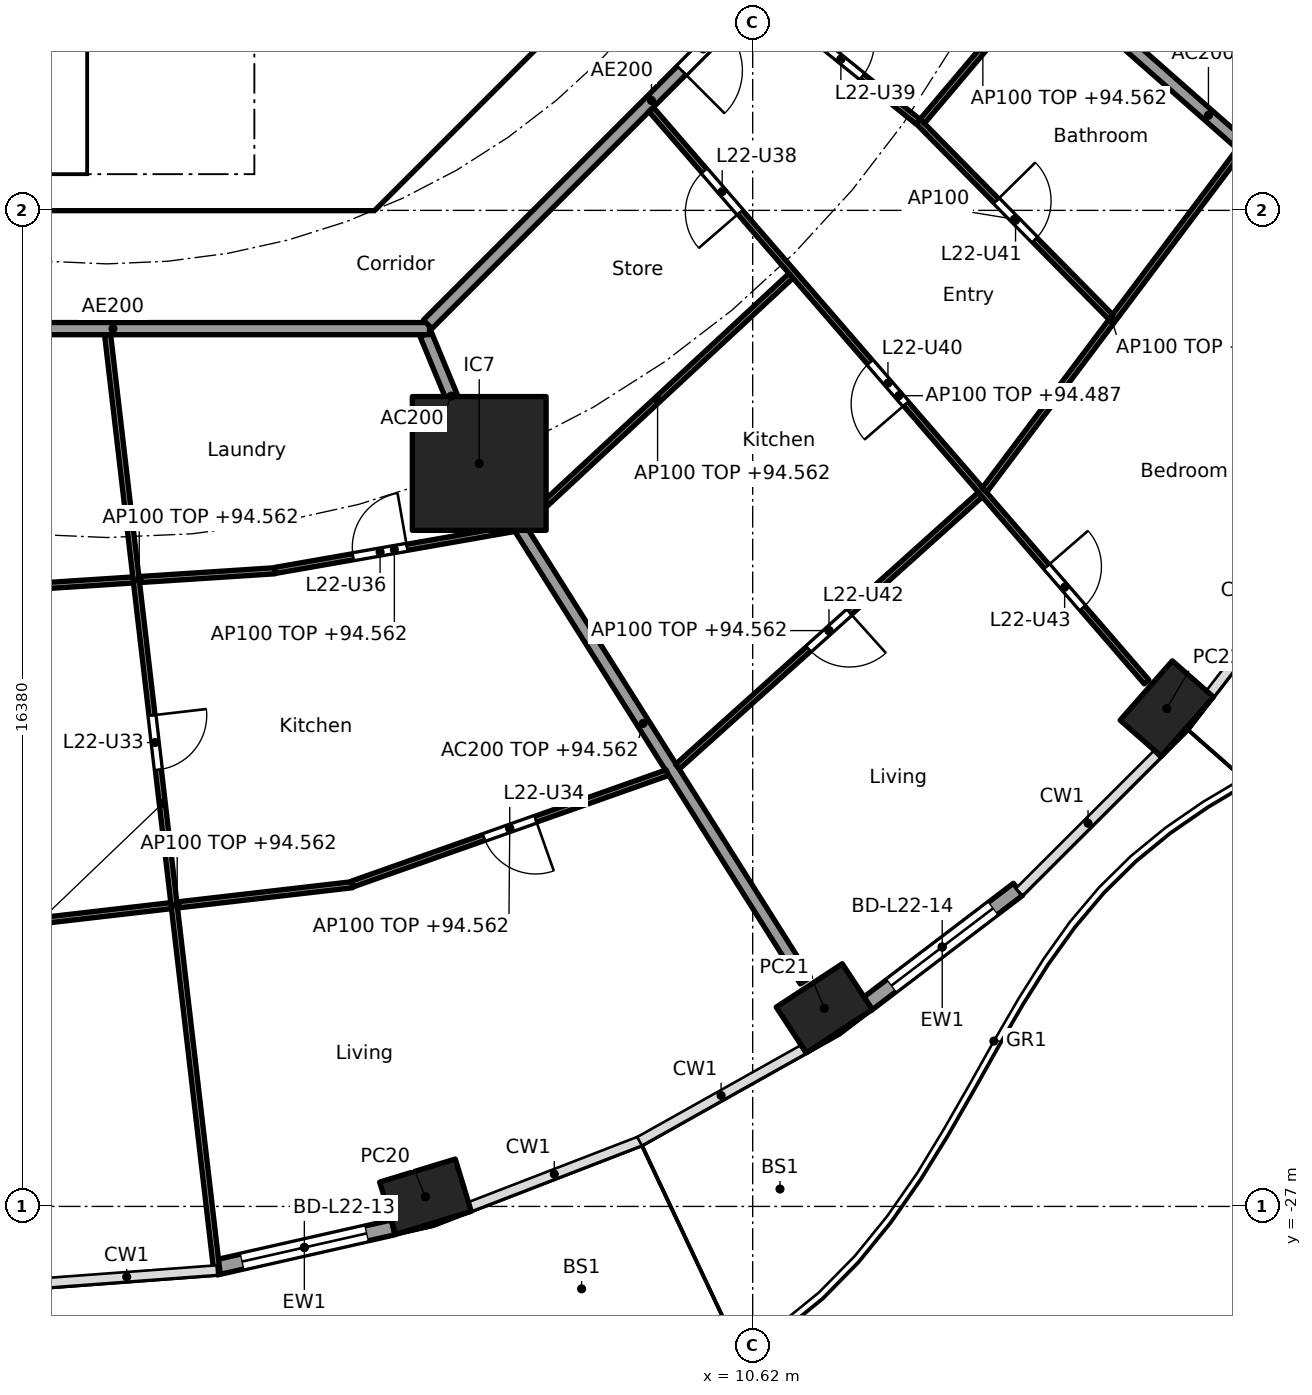
"""IFC4 building model, lengths in metres.
Left out: names, types, materials, properties, quantities, classifications, styles, units other than length and angle.
Written with IfcOpenShell. Run it as: python <this file> out.ifc"""

import sys

from ifc_helpers import new_model, si_unit, direction, frame, frame_2d, origin, origin_2d, place, context, subcontext, project, spatial, polyline, rectangle, hollow_rectangle, outline, extrude, element, fill, save


model = new_model("IFC4")
c1 = context("Model", 3, precision=1e-05, world=origin(), true_north=direction((0.0, 1.0)))
c2 = subcontext(c1, "Body", "Model", "MODEL_VIEW")
j1 = project(units=[si_unit("LENGTHUNIT", "METRE"), si_unit("PLANEANGLEUNIT", "RADIAN")], contexts=[c1])
p1 = place(None, origin())
s1 = spatial("IfcSite", under=j1, at=p1, CompositionType="ELEMENT")
p2 = place(p1, origin())
s2 = spatial("IfcBuilding", under=s1, at=p2, CompositionType="ELEMENT")
p3 = place(p2, frame((0.0, 0.0, 91.8)))
s3 = spatial("IfcBuildingStorey", under=s2, at=p3, CompositionType="ELEMENT", Elevation=91.8)
for number, where, z_axis, x_axis in (
    (1, (5.239, -26.841, 0.0), (0.0, 0.0, 1.0), (0.957, 0.292, 0.0)),
    (2, (11.798, -23.742, 0.0), (0.0, 0.0, 1.0), (0.836, 0.549, 0.0)),
    (3, (17.43, -18.813, 0.0), (0.0, 0.0, 1.0), (0.66, 0.751, 0.0)),
):
    element("IfcColumn", number, at=place(p3, frame(where, z_axis=z_axis, x_axis=x_axis)), inside=s3, PredefinedType="COLUMN", context=c2, shape_type="SweptSolid", body=[
        extrude(hollow_rectangle(XDim=1.3, YDim=0.9, WallThickness=0.045, at=origin_2d()), origin(), (0.0, 0.0, 1.0), 3.7),
    ])
p4 = place(p3, frame((6.123, -14.782, 0.0), z_axis=(0.0, 0.0, 1.0), x_axis=(1.0, 0.0, 0.0)))
e4 = element("IfcColumn", 4, at=p4, inside=s3, PredefinedType="COLUMN", context=c2, shape_type="SweptSolid", body=[
    extrude(rectangle(XDim=2.2, YDim=2.2, at=origin_2d()), origin(), (0.0, 0.0, 1.0), 3.7),
])
p5 = place(p3, frame((4.707, -27.345, 0.0), z_axis=(0.0, 0.0, 1.0), x_axis=(-0.975317607872, -0.220806620767, 0.0)))
e5 = element("IfcWall", 5, at=p5, inside=s3, PredefinedType="SOLIDWALL", context=c2, shape_type="SweptSolid", body=[
    extrude(rectangle(XDim=2.993, YDim=0.25, at=frame_2d((1.497, 0.0))), origin(), (0.0, 0.0, 1.0), 3.44),
])
p6 = place(p5, frame((0.447, 0.0, 0.0)))
e6 = element("IfcOpeningElement", 6, at=p6, cuts=e5, PredefinedType="OPENING", context=c2, shape_type="SweptSolid", body=[
    extrude(rectangle(XDim=2.1, YDim=2.4, at=frame_2d((1.05, 1.2))), frame((0.0, 0.135, 0.0), z_axis=(0.0, -1.0, 0.0), x_axis=(1.0, 0.0, 0.0)), (0.0, 0.0, 1.0), 0.27),
])
p7 = place(p3, frame((14.984, -21.785, 0.0), z_axis=(0.0, 0.0, 1.0), x_axis=(-0.796037575978, -0.605247203736, 0.0)))
e7 = element("IfcWall", 7, at=p7, inside=s3, PredefinedType="SOLIDWALL", context=c2, shape_type="SweptSolid", body=[
    extrude(rectangle(XDim=3.134, YDim=0.25, at=frame_2d((1.567, 0.0))), origin(), (0.0, 0.0, 1.0), 3.44),
])
p8 = place(p7, frame((0.517, 0.0, 0.0)))
e8 = element("IfcOpeningElement", 8, at=p8, cuts=e7, PredefinedType="OPENING", context=c2, shape_type="SweptSolid", body=[
    extrude(rectangle(XDim=2.1, YDim=2.4, at=frame_2d((1.05, 1.2))), frame((0.0, 0.135, 0.0), z_axis=(0.0, -1.0, 0.0), x_axis=(1.0, 0.0, 0.0)), (0.0, 0.0, 1.0), 0.27),
])
p9 = place(p3, frame((4.613, -9.988, 0.0), z_axis=(0.0, 0.0, 1.0), x_axis=(0.707106781187, 0.707106781187, 0.0)))
e9 = element("IfcWall", 9, at=p9, inside=s3, PredefinedType="SHEAR", context=c2, shape_type="SweptSolid", body=[
    extrude(rectangle(XDim=7.602, YDim=0.6, at=frame_2d((3.801, 0.0))), origin(), (0.0, 0.0, 1.0), 3.44),
])
p10 = place(p9, frame((3.201, 0.0, 0.0)))
e10 = element("IfcOpeningElement", 10, at=p10, cuts=e9, PredefinedType="OPENING", context=c2, shape_type="SweptSolid", body=[
    extrude(rectangle(XDim=1.2, YDim=2.1, at=frame_2d((0.6, 1.05))), frame((0.0, 0.31, 0.0), z_axis=(0.0, -1.0, 0.0), x_axis=(1.0, 0.0, 0.0)), (0.0, 0.0, 1.0), 0.62),
])
p11 = place(p3, frame((4.0, -10.025, 0.0), z_axis=(0.0, 0.0, 1.0), x_axis=(0.0, 1.0, 0.0)))
e11 = element("IfcWall", 11, at=p11, inside=s3, PredefinedType="SOLIDWALL", context=c2, shape_type="SweptSolid", body=[
    extrude(rectangle(XDim=3.0, YDim=0.2, at=frame_2d((1.5, 0.0))), origin(), (0.0, 0.0, 1.0), 3.44),
])
p12 = place(p11, frame((0.975, 0.0, 0.0)))
e12 = element("IfcOpeningElement", 12, at=p12, cuts=e11, PredefinedType="OPENING", context=c2, shape_type="SweptSolid", body=[
    extrude(rectangle(XDim=1.1, YDim=2.1, at=frame_2d((0.55, 1.05))), frame((0.0, 0.11, 0.0), z_axis=(0.0, -1.0, 0.0), x_axis=(1.0, 0.0, 0.0)), (0.0, 0.0, 1.0), 0.22),
])
p13 = place(p3, origin())
e13 = element("IfcWall", 13, at=p13, inside=s3, PredefinedType="SHEAR", context=c2, shape_type="SweptSolid", body=[
    extrude(outline(polyline([(-4.152, -10.025), (4.152, -10.025), (4.401, -9.776), (4.825, -10.2), (4.401, -10.625), (-4.401, -10.625), (-4.825, -10.2), (-4.401, -9.776), (-4.152, -10.025)])), origin(), (0.0, 0.0, 1.0), 3.44),
])
p14 = place(p3, frame((5.243, -12.657, 0.0), z_axis=(0.0, 0.0, 1.0), x_axis=(0.382747093259, -0.923853160736, 0.0)))
e14 = element("IfcWall", 14, at=p14, inside=s3, PredefinedType="PARTITIONING", context=c2, shape_type="SweptSolid", body=[
    extrude(rectangle(XDim=2.2, YDim=0.2, at=frame_2d((1.1, 0.0))), origin(), (0.0, 0.0, 1.0), 3.44),
])
p15 = place(p3, frame((6.15, -14.824, 0.0), z_axis=(0.0, 0.0, 1.0), x_axis=(0.533492589682, -0.845804739142, 0.0)))
e15 = element("IfcWall", 15, at=p15, inside=s3, PredefinedType="PARTITIONING", context=c2, shape_type="SweptSolid", body=[
    extrude(rectangle(XDim=10.006, YDim=0.2, at=frame_2d((5.003, 0.0))), origin(), (0.0, 0.0, 1.0), 2.762),
])
p16 = place(p3, frame((14.82, -6.156, 0.0), z_axis=(0.0, 0.0, 1.0), x_axis=(0.750582231659, -0.660777052808, 0.0)))
e16 = element("IfcWall", 16, at=p16, inside=s3, PredefinedType="PARTITIONING", context=c2, shape_type="SweptSolid", body=[
    extrude(rectangle(XDim=8.781, YDim=0.2, at=frame_2d((4.391, 0.0))), origin(), (0.0, 0.0, 1.0), 2.762),
])
p17 = place(p3, frame((-5.104, -12.565, 0.0), z_axis=(0.0, 0.0, 1.0), x_axis=(1.0, 0.0, 0.0)))
e17 = element("IfcWall", 17, at=p17, inside=s3, PredefinedType="PARTITIONING", context=c2, shape_type="SweptSolid", body=[
    extrude(rectangle(XDim=10.409, YDim=0.2, at=frame_2d((5.205, 0.0))), origin(), (0.0, 0.0, 1.0), 3.44),
])
p18 = place(p3, frame((5.275, -12.494, 0.0), z_axis=(0.0, 0.0, 1.0), x_axis=(0.707106781187, 0.707106781187, 0.0)))
e18 = element("IfcWall", 18, at=p18, inside=s3, PredefinedType="PARTITIONING", context=c2, shape_type="SweptSolid", body=[
    extrude(rectangle(XDim=10.409, YDim=0.2, at=frame_2d((5.205, 0.0))), origin(), (0.0, 0.0, 1.0), 3.44),
])
p19 = place(p18, frame((5.906, 0.0, 0.0)))
e19 = element("IfcOpeningElement", 19, at=p19, cuts=e18, PredefinedType="OPENING", context=c2, shape_type="SweptSolid", body=[
    extrude(rectangle(XDim=1.0, YDim=2.1, at=frame_2d((0.5, 1.05))), frame((0.0, 0.11, 0.0), z_axis=(0.0, -1.0, 0.0), x_axis=(1.0, 0.0, 0.0)), (0.0, 0.0, 1.0), 0.22),
])
p20 = place(p3, frame((-1.703, -16.836, 0.0), z_axis=(0.0, 0.0, 1.0), x_axis=(0.997899919101, 0.064774620473, 0.0)))
e20 = element("IfcWall", 20, at=p20, inside=s3, PredefinedType="PARTITIONING", context=c2, shape_type="SweptSolid", body=[
    extrude(rectangle(XDim=4.478, YDim=0.1, at=frame_2d((2.239, 0.0))), origin(), (0.0, 0.0, 1.0), 2.762),
])
p21 = place(p3, frame((-1.726, -22.375, 0.0), z_axis=(0.0, 0.0, 1.0), x_axis=(0.993392336919, 0.114767874207, 0.0)))
e21 = element("IfcWall", 21, at=p21, inside=s3, PredefinedType="PARTITIONING", context=c2, shape_type="SweptSolid", body=[
    extrude(rectangle(XDim=5.801, YDim=0.1, at=frame_2d((2.9, 0.0))), origin(), (0.0, 0.0, 1.0), 2.762),
])
p22 = place(p3, frame((0.011, -12.664, 0.0), z_axis=(0.0, 0.0, 1.0), x_axis=(0.115841404661, -0.993267722704, 0.0)))
e22 = element("IfcWall", 22, at=p22, inside=s3, PredefinedType="PARTITIONING", context=c2, shape_type="SweptSolid", body=[
    extrude(rectangle(XDim=15.528, YDim=0.1, at=frame_2d((7.764, 0.0))), origin(), (0.0, 0.0, 1.0), 2.687),
])
p23 = place(p22, frame((6.303, 0.0, 0.0)))
e23 = element("IfcOpeningElement", 23, at=p23, cuts=e22, PredefinedType="OPENING", context=c2, shape_type="SweptSolid", body=[
    extrude(rectangle(XDim=0.9, YDim=2.1, at=frame_2d((0.45, 1.05))), frame((0.0, 0.06, 0.0), z_axis=(0.0, -1.0, 0.0), x_axis=(1.0, 0.0, 0.0)), (0.0, 0.0, 1.0), 0.12),
])
p24 = place(p3, frame((2.765, -16.541, 0.0), z_axis=(0.0, 0.0, 1.0), x_axis=(0.984998714702, 0.172561676036, 0.0)))
e24 = element("IfcWall", 24, at=p24, inside=s3, PredefinedType="PARTITIONING", context=c2, shape_type="SweptSolid", body=[
    extrude(rectangle(XDim=3.984, YDim=0.1, at=frame_2d((1.992, 0.0))), origin(), (0.0, 0.0, 1.0), 2.762),
])
p25 = place(p24, frame((1.304, 0.0, 0.0)))
e25 = element("IfcOpeningElement", 25, at=p25, cuts=e24, PredefinedType="OPENING", context=c2, shape_type="SweptSolid", body=[
    extrude(rectangle(XDim=0.9, YDim=2.1, at=frame_2d((0.45, 1.05))), frame((0.0, 0.06, 0.0), z_axis=(0.0, -1.0, 0.0), x_axis=(1.0, 0.0, 0.0)), (0.0, 0.0, 1.0), 0.12),
])
p26 = place(p3, frame((4.034, -21.698, 0.0), z_axis=(0.0, 0.0, 1.0), x_axis=(0.942861482644, 0.33318497047, 0.0)))
e26 = element("IfcWall", 26, at=p26, inside=s3, PredefinedType="PARTITIONING", context=c2, shape_type="SweptSolid", body=[
    extrude(rectangle(XDim=5.495, YDim=0.1, at=frame_2d((2.748, 0.0))), origin(), (0.0, 0.0, 1.0), 2.762),
])
p27 = place(p26, frame((2.297, 0.0, 0.0)))
e27 = element("IfcOpeningElement", 27, at=p27, cuts=e26, PredefinedType="OPENING", context=c2, shape_type="SweptSolid", body=[
    extrude(rectangle(XDim=0.9, YDim=2.1, at=frame_2d((0.45, 1.05))), frame((0.0, 0.06, 0.0), z_axis=(0.0, -1.0, 0.0), x_axis=(1.0, 0.0, 0.0)), (0.0, 0.0, 1.0), 0.12),
])
p28 = place(p3, frame((6.861, -15.768, 0.0), z_axis=(0.0, 0.0, 1.0), x_axis=(0.733011256509, 0.680216508056, 0.0)))
e28 = element("IfcWall", 28, at=p28, inside=s3, PredefinedType="PARTITIONING", context=c2, shape_type="SweptSolid", body=[
    extrude(rectangle(XDim=5.989, YDim=0.1, at=frame_2d((2.994, 0.0))), origin(), (0.0, 0.0, 1.0), 2.762),
])
p29 = place(p3, frame((9.384, -19.768, 0.0), z_axis=(0.0, 0.0, 1.0), x_axis=(0.74387407395, 0.668319805262, 0.0)))
e29 = element("IfcWall", 29, at=p29, inside=s3, PredefinedType="PARTITIONING", context=c2, shape_type="SweptSolid", body=[
    extrude(rectangle(XDim=6.695, YDim=0.1, at=frame_2d((3.348, 0.0))), origin(), (0.0, 0.0, 1.0), 2.762),
])
p30 = place(p29, frame((2.898, 0.0, 0.0)))
e30 = element("IfcOpeningElement", 30, at=p30, cuts=e29, PredefinedType="OPENING", context=c2, shape_type="SweptSolid", body=[
    extrude(rectangle(XDim=0.9, YDim=2.1, at=frame_2d((0.45, 1.05))), frame((0.0, 0.06, 0.0), z_axis=(0.0, -1.0, 0.0), x_axis=(1.0, 0.0, 0.0)), (0.0, 0.0, 1.0), 0.12),
])
p31 = place(p3, frame((8.95, -8.96, 0.0), z_axis=(0.0, 0.0, 1.0), x_axis=(0.65441081073, -0.756139200676, 0.0)))
e31 = element("IfcWall", 31, at=p31, inside=s3, PredefinedType="PARTITIONING", context=c2, shape_type="SweptSolid", body=[
    extrude(rectangle(XDim=12.451, YDim=0.1, at=frame_2d((6.226, 0.0))), origin(), (0.0, 0.0, 1.0), 2.687),
])
p32 = place(p31, frame((1.336, 0.0, 0.0)))
e32 = element("IfcOpeningElement", 32, at=p32, cuts=e31, PredefinedType="OPENING", context=c2, shape_type="SweptSolid", body=[
    extrude(rectangle(XDim=0.9, YDim=2.1, at=frame_2d((0.45, 1.05))), frame((0.0, 0.06, 0.0), z_axis=(0.0, -1.0, 0.0), x_axis=(1.0, 0.0, 0.0)), (0.0, 0.0, 1.0), 0.12),
])
p33 = place(p31, frame((5.501, 0.0, 0.0)))
e33 = element("IfcOpeningElement", 33, at=p33, cuts=e31, PredefinedType="OPENING", context=c2, shape_type="SweptSolid", body=[
    extrude(rectangle(XDim=0.9, YDim=2.1, at=frame_2d((0.45, 1.05))), frame((0.0, 0.06, 0.0), z_axis=(0.0, -1.0, 0.0), x_axis=(1.0, 0.0, 0.0)), (0.0, 0.0, 1.0), 0.12),
])
p34 = place(p31, frame((9.941, 0.0, 0.0)))
e34 = element("IfcOpeningElement", 34, at=p34, cuts=e31, PredefinedType="OPENING", context=c2, shape_type="SweptSolid", body=[
    extrude(rectangle(XDim=0.9, YDim=2.1, at=frame_2d((0.45, 1.05))), frame((0.0, 0.06, 0.0), z_axis=(0.0, -1.0, 0.0), x_axis=(1.0, 0.0, 0.0)), (0.0, 0.0, 1.0), 0.12),
])
p35 = place(p3, frame((14.432, -15.219, 0.0), z_axis=(0.0, 0.0, 1.0), x_axis=(0.601001256685, 0.799248077548, 0.0)))
e35 = element("IfcWall", 35, at=p35, inside=s3, PredefinedType="PARTITIONING", context=c2, shape_type="SweptSolid", body=[
    extrude(rectangle(XDim=6.98, YDim=0.1, at=frame_2d((3.49, 0.0))), origin(), (0.0, 0.0, 1.0), 2.762),
])
p36 = place(p3, frame((10.802, -7.107, 0.0), z_axis=(0.0, 0.0, 1.0), x_axis=(0.776992142502, -0.62951029419, 0.0)))
e36 = element("IfcWall", 36, at=p36, inside=s3, PredefinedType="PARTITIONING", context=c2, shape_type="SweptSolid", body=[
    extrude(rectangle(XDim=3.263, YDim=0.1, at=frame_2d((1.631, 0.0))), origin(), (0.0, 0.0, 1.0), 2.687),
])
p37 = place(p36, frame((1.181, 0.0, 0.0)))
e37 = element("IfcOpeningElement", 37, at=p37, cuts=e36, PredefinedType="OPENING", context=c2, shape_type="SweptSolid", body=[
    extrude(rectangle(XDim=0.9, YDim=2.1, at=frame_2d((0.45, 1.05))), frame((0.0, 0.06, 0.0), z_axis=(0.0, -1.0, 0.0), x_axis=(1.0, 0.0, 0.0)), (0.0, 0.0, 1.0), 0.12),
])
p38 = place(p3, frame((13.341, -9.157, 0.0), z_axis=(0.0, 0.0, 1.0), x_axis=(0.701624526877, -0.712546856904, 0.0)))
e38 = element("IfcWall", 38, at=p38, inside=s3, PredefinedType="PARTITIONING", context=c2, shape_type="SweptSolid", body=[
    extrude(rectangle(XDim=4.515, YDim=0.1, at=frame_2d((2.258, 0.0))), origin(), (0.0, 0.0, 1.0), 3.44),
])
p39 = place(p38, frame((1.833, 0.0, 0.0)))
e39 = element("IfcOpeningElement", 39, at=p39, cuts=e38, PredefinedType="OPENING", context=c2, shape_type="SweptSolid", body=[
    extrude(rectangle(XDim=0.9, YDim=2.1, at=frame_2d((0.45, 1.05))), frame((0.0, 0.06, 0.0), z_axis=(0.0, -1.0, 0.0), x_axis=(1.0, 0.0, 0.0)), (0.0, 0.0, 1.0), 0.12),
])
p40 = place(p3, frame((13.409, -9.155, 0.0), z_axis=(0.0, 0.0, 1.0), x_axis=(0.646130325831, 0.763227097293, 0.0)))
e40 = element("IfcWall", 40, at=p40, inside=s3, PredefinedType="PARTITIONING", context=c2, shape_type="SweptSolid", body=[
    extrude(rectangle(XDim=3.084, YDim=0.1, at=frame_2d((1.542, 0.0))), origin(), (0.0, 0.0, 1.0), 2.762),
])
p41 = place(p6, origin())
e41 = element("IfcDoor", 41, at=p41, inside=s3, OperationType="SLIDING_TO_LEFT", PredefinedType="DOOR", context=c2, shape_type="SweptSolid", body=[
    extrude(rectangle(XDim=2.1, YDim=2.4, at=frame_2d((1.05, 1.2))), frame((0.0, 0.025, 0.0), z_axis=(0.0, -1.0, 0.0), x_axis=(1.0, 0.0, 0.0)), (0.0, 0.0, 1.0), 0.05),
])
fill(e6, e41)
p42 = place(p8, origin())
e42 = element("IfcDoor", 42, at=p42, inside=s3, OperationType="SLIDING_TO_LEFT", PredefinedType="DOOR", context=c2, shape_type="SweptSolid", body=[
    extrude(rectangle(XDim=2.1, YDim=2.4, at=frame_2d((1.05, 1.2))), frame((0.0, 0.025, 0.0), z_axis=(0.0, -1.0, 0.0), x_axis=(1.0, 0.0, 0.0)), (0.0, 0.0, 1.0), 0.05),
])
fill(e8, e42)
p43 = place(p12, origin())
e43 = element("IfcDoor", 43, at=p43, inside=s3, OperationType="SINGLE_SWING_RIGHT", PredefinedType="DOOR", context=c2, shape_type="SweptSolid", body=[
    extrude(rectangle(XDim=1.1, YDim=2.1, at=frame_2d((0.55, 1.05))), frame((0.0, 0.025, 0.0), z_axis=(0.0, -1.0, 0.0), x_axis=(1.0, 0.0, 0.0)), (0.0, 0.0, 1.0), 0.05),
])
fill(e12, e43)
p44 = place(p23, origin())
e44 = element("IfcDoor", 44, at=p44, inside=s3, OperationType="SINGLE_SWING_LEFT", PredefinedType="DOOR", context=c2, shape_type="SweptSolid", body=[
    extrude(rectangle(XDim=0.9, YDim=2.1, at=frame_2d((0.45, 1.05))), frame((0.0, 0.025, 0.0), z_axis=(0.0, -1.0, 0.0), x_axis=(1.0, 0.0, 0.0)), (0.0, 0.0, 1.0), 0.05),
])
fill(e23, e44)
p45 = place(p27, frame((0.9, 0.0, 0.0), x_axis=(-1.0, 0.0, 0.0)))
e45 = element("IfcDoor", 45, at=p45, inside=s3, OperationType="SINGLE_SWING_LEFT", PredefinedType="DOOR", context=c2, shape_type="SweptSolid", body=[
    extrude(rectangle(XDim=0.9, YDim=2.1, at=frame_2d((0.45, 1.05))), frame((0.0, 0.025, 0.0), z_axis=(0.0, -1.0, 0.0), x_axis=(1.0, 0.0, 0.0)), (0.0, 0.0, 1.0), 0.05),
])
fill(e27, e45)
p46 = place(p25, origin())
e46 = element("IfcDoor", 46, at=p46, inside=s3, OperationType="SINGLE_SWING_RIGHT", PredefinedType="DOOR", context=c2, shape_type="SweptSolid", body=[
    extrude(rectangle(XDim=0.9, YDim=2.1, at=frame_2d((0.45, 1.05))), frame((0.0, 0.025, 0.0), z_axis=(0.0, -1.0, 0.0), x_axis=(1.0, 0.0, 0.0)), (0.0, 0.0, 1.0), 0.05),
])
fill(e25, e46)
p47 = place(p19, frame((1.0, 0.0, 0.0), x_axis=(-1.0, 0.0, 0.0)))
e47 = element("IfcDoor", 47, at=p47, inside=s3, OperationType="SINGLE_SWING_RIGHT", PredefinedType="DOOR", context=c2, shape_type="SweptSolid", body=[
    extrude(rectangle(XDim=1.0, YDim=2.1, at=frame_2d((0.5, 1.05))), frame((0.0, 0.025, 0.0), z_axis=(0.0, -1.0, 0.0), x_axis=(1.0, 0.0, 0.0)), (0.0, 0.0, 1.0), 0.05),
])
fill(e19, e47)
p48 = place(p32, frame((0.9, 0.0, 0.0), x_axis=(-1.0, 0.0, 0.0)))
e48 = element("IfcDoor", 48, at=p48, inside=s3, OperationType="SINGLE_SWING_LEFT", PredefinedType="DOOR", context=c2, shape_type="SweptSolid", body=[
    extrude(rectangle(XDim=0.9, YDim=2.1, at=frame_2d((0.45, 1.05))), frame((0.0, 0.025, 0.0), z_axis=(0.0, -1.0, 0.0), x_axis=(1.0, 0.0, 0.0)), (0.0, 0.0, 1.0), 0.05),
])
fill(e32, e48)
p49 = place(p37, origin())
e49 = element("IfcDoor", 49, at=p49, inside=s3, OperationType="SINGLE_SWING_LEFT", PredefinedType="DOOR", context=c2, shape_type="SweptSolid", body=[
    extrude(rectangle(XDim=0.9, YDim=2.1, at=frame_2d((0.45, 1.05))), frame((0.0, 0.025, 0.0), z_axis=(0.0, -1.0, 0.0), x_axis=(1.0, 0.0, 0.0)), (0.0, 0.0, 1.0), 0.05),
])
fill(e37, e49)
p50 = place(p33, frame((0.9, 0.0, 0.0), x_axis=(-1.0, 0.0, 0.0)))
e50 = element("IfcDoor", 50, at=p50, inside=s3, OperationType="SINGLE_SWING_LEFT", PredefinedType="DOOR", context=c2, shape_type="SweptSolid", body=[
    extrude(rectangle(XDim=0.9, YDim=2.1, at=frame_2d((0.45, 1.05))), frame((0.0, 0.025, 0.0), z_axis=(0.0, -1.0, 0.0), x_axis=(1.0, 0.0, 0.0)), (0.0, 0.0, 1.0), 0.05),
])
fill(e33, e50)
p51 = place(p39, origin())
e51 = element("IfcDoor", 51, at=p51, inside=s3, OperationType="SINGLE_SWING_LEFT", PredefinedType="DOOR", context=c2, shape_type="SweptSolid", body=[
    extrude(rectangle(XDim=0.9, YDim=2.1, at=frame_2d((0.45, 1.05))), frame((0.0, 0.025, 0.0), z_axis=(0.0, -1.0, 0.0), x_axis=(1.0, 0.0, 0.0)), (0.0, 0.0, 1.0), 0.05),
])
fill(e39, e51)
p52 = place(p30, frame((0.9, 0.0, 0.0), x_axis=(-1.0, 0.0, 0.0)))
e52 = element("IfcDoor", 52, at=p52, inside=s3, OperationType="SINGLE_SWING_LEFT", PredefinedType="DOOR", context=c2, shape_type="SweptSolid", body=[
    extrude(rectangle(XDim=0.9, YDim=2.1, at=frame_2d((0.45, 1.05))), frame((0.0, 0.025, 0.0), z_axis=(0.0, -1.0, 0.0), x_axis=(1.0, 0.0, 0.0)), (0.0, 0.0, 1.0), 0.05),
])
fill(e30, e52)
p53 = place(p34, origin())
e53 = element("IfcDoor", 53, at=p53, inside=s3, OperationType="SINGLE_SWING_LEFT", PredefinedType="DOOR", context=c2, shape_type="SweptSolid", body=[
    extrude(rectangle(XDim=0.9, YDim=2.1, at=frame_2d((0.45, 1.05))), frame((0.0, 0.025, 0.0), z_axis=(0.0, -1.0, 0.0), x_axis=(1.0, 0.0, 0.0)), (0.0, 0.0, 1.0), 0.05),
])
fill(e34, e53)
save(model, sys.argv[1])
